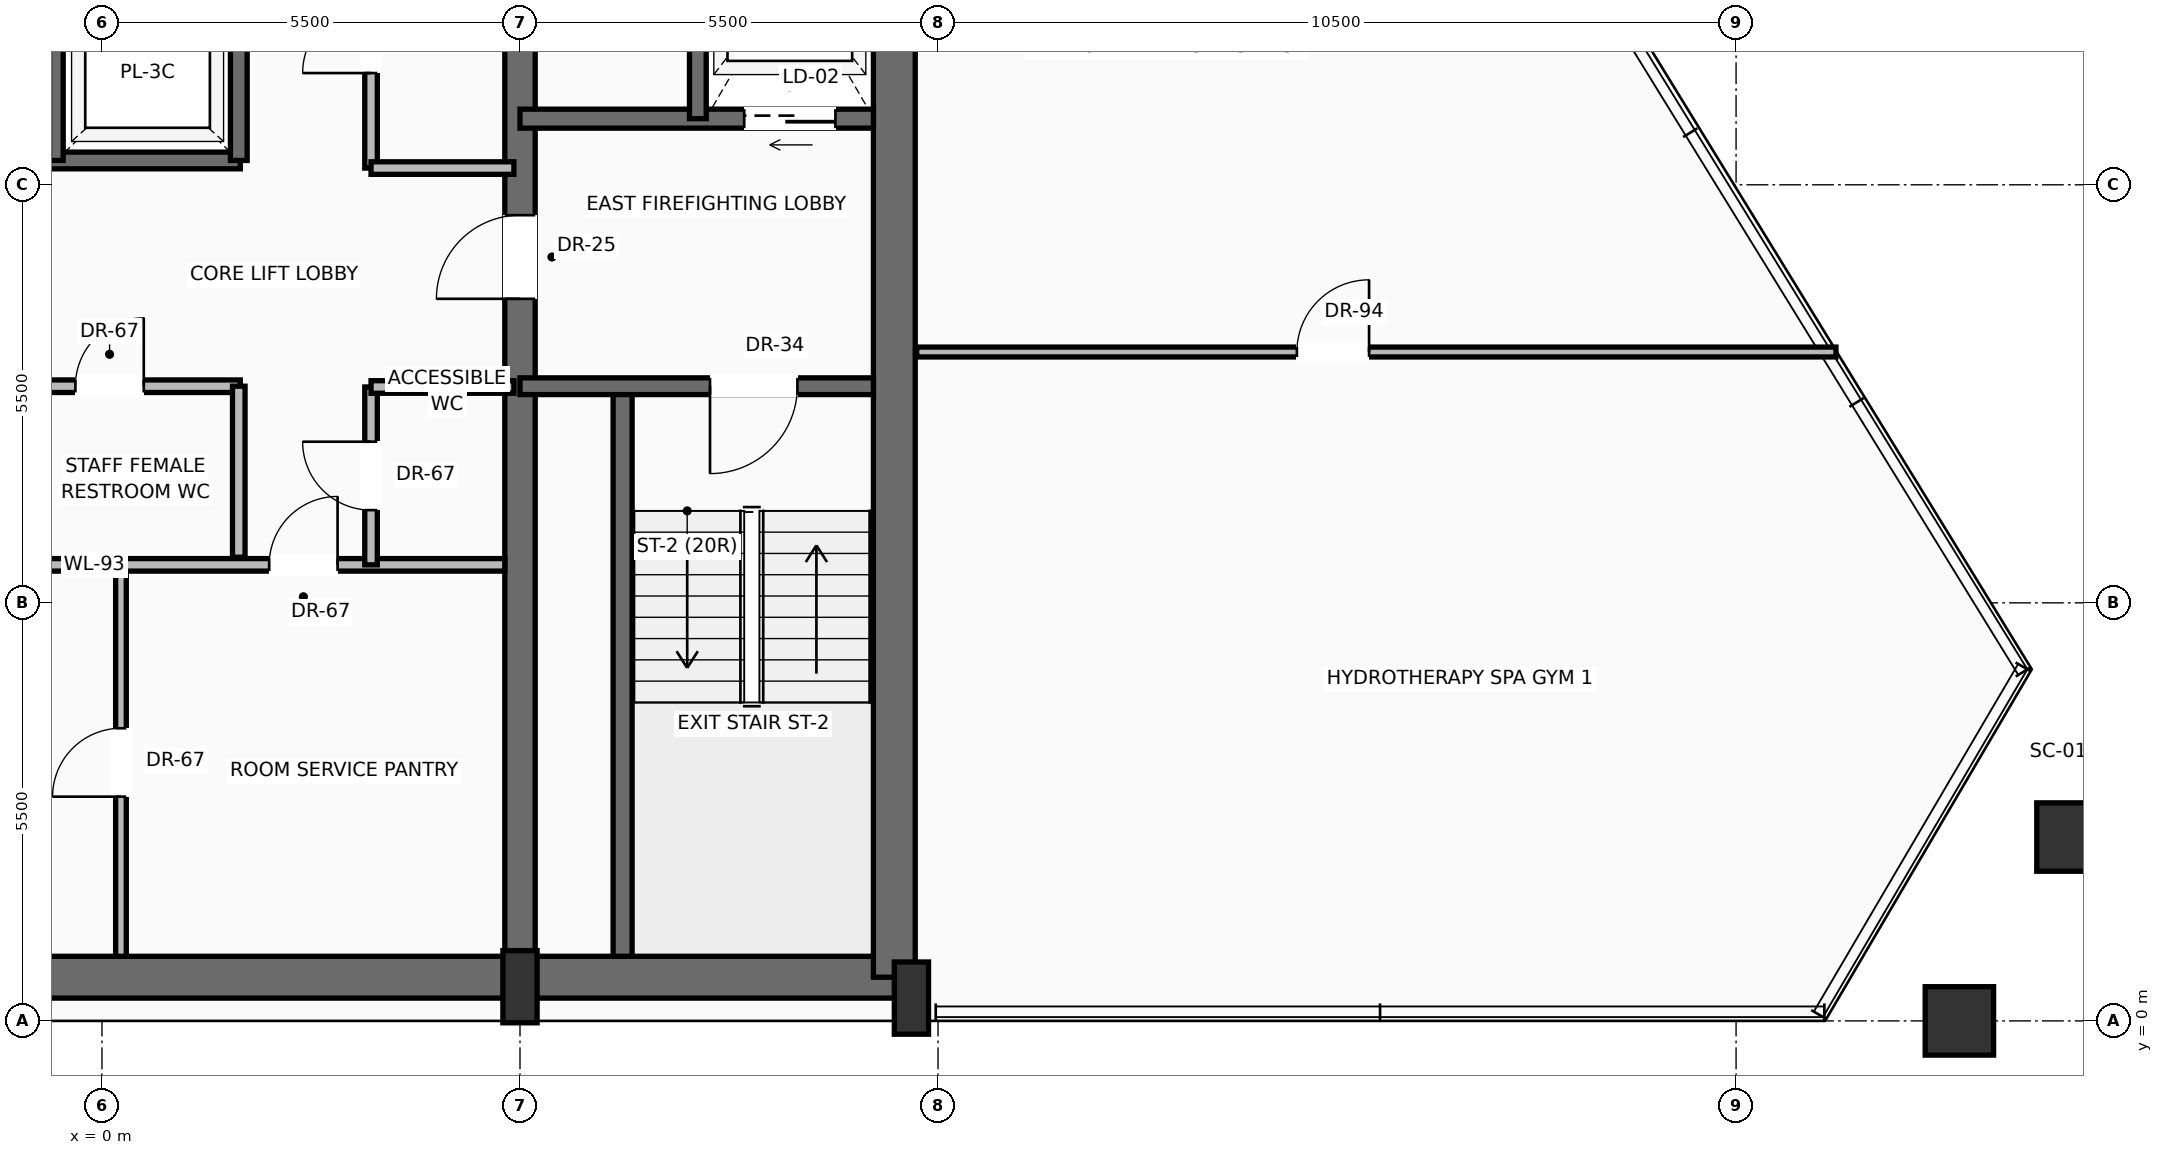
"""IFC4 building model, lengths in metres.
Left out: names, types, materials, properties, quantities, classifications, styles, units other than length and angle.
Written with IfcOpenShell. Run it as: python <this file> out.ifc"""

import sys

from ifc_helpers import new_model, si_unit, direction, frame, frame_2d, origin, origin_2d, place, context, subcontext, project, spatial, rectangle, hollow_rectangle, extrude, source, transform, mapped, element, fill, save


model = new_model("IFC4")
c1 = context("Model", 3, precision=1e-05, world=origin(), true_north=direction((0.0, 1.0)))
c2 = subcontext(c1, "Body", "Model", "MODEL_VIEW")
j1 = project(units=[si_unit("LENGTHUNIT", "METRE"), si_unit("PLANEANGLEUNIT", "RADIAN")], contexts=[c1])
p1 = place(None, origin())
s1 = spatial("IfcSite", under=j1, at=p1, CompositionType="ELEMENT")
p2 = place(p1, origin())
s2 = spatial("IfcBuilding", under=s1, at=p2, CompositionType="ELEMENT")
p3 = place(p2, frame((0.0, 0.0, 244.15)))
s3 = spatial("IfcBuildingStorey", under=s2, at=p3, CompositionType="ELEMENT", Elevation=244.15)
p4 = place(p3, frame((-10.65, 0.575, 0.0), z_axis=(0.0, 0.0, 1.0), x_axis=(1.0, 0.0, 0.0)))
e1 = element("IfcWall", 1, at=p4, inside=s3, PredefinedType="SHEAR", context=c2, shape_type="SweptSolid", body=[
    extrude(rectangle(XDim=21.3, YDim=0.55, at=frame_2d((10.65, 0.0))), origin(), (0.0, 0.0, 1.0), 3.24),
])
p5 = place(p3, frame((10.425, 0.575, 0.0), z_axis=(0.0, 0.0, 1.0), x_axis=(0.0, 1.0, 0.0)))
e2 = element("IfcWall", 2, at=p5, inside=s3, PredefinedType="SHEAR", context=c2, shape_type="SweptSolid", body=[
    extrude(rectangle(XDim=15.45, YDim=0.55, at=frame_2d((7.725, 0.0))), origin(), (0.0, 0.0, 1.0), 3.24),
])
p6 = place(p3, frame((5.5, 0.575, 0.0), z_axis=(0.0, 0.0, 1.0), x_axis=(0.0, 1.0, 0.0)))
e3 = element("IfcWall", 3, at=p6, inside=s3, PredefinedType="SHEAR", context=c2, shape_type="SweptSolid", body=[
    extrude(rectangle(XDim=15.45, YDim=0.4, at=frame_2d((7.725, 0.0))), origin(), (0.0, 0.0, 1.0), 3.24),
])
p7 = place(p6, frame((8.925, 0.0, 0.0)))
e4 = element("IfcOpeningElement", 4, at=p7, cuts=e3, PredefinedType="OPENING", context=c2, shape_type="SweptSolid", body=[
    extrude(rectangle(XDim=1.1, YDim=2.2, at=frame_2d((0.55, 1.1))), frame((0.0, 0.21, 0.0), z_axis=(0.0, -1.0, 0.0), x_axis=(1.0, 0.0, 0.0)), (0.0, 0.0, 1.0), 0.42),
])
m1 = source(origin(), c2, "Body", "SweptSolid", [
    extrude(rectangle(XDim=0.45, YDim=0.95, at=origin_2d()), origin(), (0.0, 0.0, 1.0), 3.45),
])
for number, where, z_axis, x_axis in (
    (5, (5.5, 0.45, 0.0), (0.0, 0.0, 1.0), (1.0, 0.0, 0.0)),
    (6, (10.65, 0.3, 0.0), (0.0, 0.0, 1.0), (1.0, 0.0, 0.0)),
):
    element("IfcColumn", number, at=place(p3, frame(where, z_axis=z_axis, x_axis=x_axis)), inside=s3, PredefinedType="PILASTER", context=c2, shape_type="MappedRepresentation", body=[
        mapped(m1, transform((0.0, 0.0, 0.0), scale=1.0)),
    ])
m2 = source(origin(), c2, "Body", "SweptSolid", [
    extrude(hollow_rectangle(XDim=0.9, YDim=0.9, WallThickness=0.045, at=origin_2d()), origin(), (0.0, 0.0, 1.0), 3.441),
])
p8 = place(p3, frame((24.438, 0.0, 0.004), z_axis=(0.000567536798, 0.0, 0.999999838951), x_axis=(1.0, 0.0, 0.0)))
e7 = element("IfcColumn", 7, at=p8, inside=s3, PredefinedType="COLUMN", context=c2, shape_type="MappedRepresentation", body=[
    mapped(m2, transform((0.0, 0.0, 0.0), scale=1.0)),
])
m3 = source(origin(), c2, "Body", "SweptSolid", [
    extrude(hollow_rectangle(XDim=0.9, YDim=0.9, WallThickness=0.045, at=origin_2d()), origin(), (0.0, 0.0, 1.0), 3.442),
])
p9 = place(p3, frame((25.906, 2.419, 0.004), z_axis=(-0.010213783405, -0.016242752776, 0.999815908861), x_axis=(0.846541360578, -0.53232295163, 0.0)))
e8 = element("IfcColumn", 8, at=p9, inside=s3, PredefinedType="COLUMN", context=c2, shape_type="MappedRepresentation", body=[
    mapped(m3, transform((0.0, 0.0, 0.0), scale=1.0)),
])
p10 = place(p3, frame((6.85, 0.85, 0.0), z_axis=(0.0, 0.0, 1.0), x_axis=(0.0, 1.0, 0.0)))
e9 = element("IfcWall", 9, at=p10, inside=s3, PredefinedType="SOLIDWALL", context=c2, shape_type="SweptSolid", body=[
    extrude(rectangle(XDim=7.5, YDim=0.25, at=frame_2d((3.75, 0.0))), origin(), (0.0, 0.0, 1.0), 3.24),
])
p11 = place(p3, frame((10.15, 8.35, 0.0), z_axis=(0.0, 0.0, 1.0), x_axis=(-1.0, 0.0, 0.0)))
e10 = element("IfcWall", 10, at=p11, inside=s3, PredefinedType="SOLIDWALL", context=c2, shape_type="SweptSolid", body=[
    extrude(rectangle(XDim=4.65, YDim=0.22, at=frame_2d((2.325, 0.0))), origin(), (0.0, 0.0, 1.0), 3.24),
])
p12 = place(p11, frame((1.0, 0.0, 0.0)))
e11 = element("IfcOpeningElement", 11, at=p12, cuts=e10, PredefinedType="OPENING", context=c2, shape_type="SweptSolid", body=[
    extrude(rectangle(XDim=1.15, YDim=2.2, at=frame_2d((0.575, 1.1))), frame((0.0, 0.12, 0.0), z_axis=(0.0, -1.0, 0.0), x_axis=(1.0, 0.0, 0.0)), (0.0, 0.0, 1.0), 0.24),
])
p13 = place(p3, frame((10.15, 11.87, 0.0), z_axis=(0.0, 0.0, 1.0), x_axis=(-1.0, 0.0, 0.0)))
e12 = element("IfcWall", 12, at=p13, inside=s3, PredefinedType="SOLIDWALL", context=c2, shape_type="SweptSolid", body=[
    extrude(rectangle(XDim=4.65, YDim=0.25, at=frame_2d((2.325, 0.0))), origin(), (0.0, 0.0, 1.0), 3.24),
])
p14 = place(p13, frame((0.5, 0.0, 0.0)))
e13 = element("IfcOpeningElement", 13, at=p14, cuts=e12, PredefinedType="OPENING", context=c2, shape_type="SweptSolid", body=[
    extrude(rectangle(XDim=1.2, YDim=2.25, at=frame_2d((0.6, 1.125))), frame((0.0, 0.135, 0.0), z_axis=(0.0, -1.0, 0.0), x_axis=(1.0, 0.0, 0.0)), (0.0, 0.0, 1.0), 0.27),
])
p15 = place(p3, frame((7.84, 11.87, 0.0), z_axis=(0.0, 0.0, 1.0), x_axis=(0.0, 1.0, 0.0)))
e14 = element("IfcWall", 14, at=p15, inside=s3, PredefinedType="SOLIDWALL", context=c2, shape_type="SweptSolid", body=[
    extrude(rectangle(XDim=3.88, YDim=0.22, at=frame_2d((1.94, 0.0))), origin(), (0.0, 0.0, 1.0), 3.24),
])
p16 = place(p3, frame((-5.5, 6.0, 0.0), z_axis=(0.0, 0.0, 1.0), x_axis=(1.0, 0.0, 0.0)))
e15 = element("IfcWall", 15, at=p16, inside=s3, PredefinedType="PARTITIONING", context=c2, shape_type="SweptSolid", body=[
    extrude(rectangle(XDim=10.8, YDim=0.165, at=frame_2d((5.4, 0.0))), origin(), (0.0, 0.0, 1.0), 3.232),
])
p17 = place(p16, frame((7.7, 0.0, 0.0)))
e16 = element("IfcOpeningElement", 16, at=p17, cuts=e15, PredefinedType="OPENING", context=c2, shape_type="SweptSolid", body=[
    extrude(rectangle(XDim=0.9, YDim=2.1, at=frame_2d((0.45, 1.05))), frame((0.0, 0.093, 0.0), z_axis=(0.0, -1.0, 0.0), x_axis=(1.0, 0.0, 0.0)), (0.0, 0.0, 1.0), 0.185),
])
p18 = place(p3, frame((0.25, 0.85, 0.0), z_axis=(0.0, 0.0, 1.0), x_axis=(0.0, 1.0, 0.0)))
e17 = element("IfcWall", 17, at=p18, inside=s3, PredefinedType="PARTITIONING", context=c2, shape_type="SweptSolid", body=[
    extrude(rectangle(XDim=5.03, YDim=0.14, at=frame_2d((2.515, 0.0))), origin(), (0.0, 0.0, 1.0), 3.232),
])
p19 = place(p18, frame((2.1, 0.0, 0.0)))
e18 = element("IfcOpeningElement", 18, at=p19, cuts=e17, PredefinedType="OPENING", context=c2, shape_type="SweptSolid", body=[
    extrude(rectangle(XDim=0.9, YDim=2.1, at=frame_2d((0.45, 1.05))), frame((0.0, 0.08, 0.0), z_axis=(0.0, -1.0, 0.0), x_axis=(1.0, 0.0, 0.0)), (0.0, 0.0, 1.0), 0.16),
])
p20 = place(p3, frame((3.54, 6.0, 0.0), z_axis=(0.0, 0.0, 1.0), x_axis=(0.0, 1.0, 0.0)))
e19 = element("IfcWall", 19, at=p20, inside=s3, PredefinedType="PARTITIONING", context=c2, shape_type="SweptSolid", body=[
    extrude(rectangle(XDim=2.34, YDim=0.165, at=frame_2d((1.17, 0.0))), origin(), (0.0, 0.0, 1.0), 3.232),
])
p21 = place(p20, frame((0.72, 0.0, 0.0)))
e20 = element("IfcOpeningElement", 20, at=p21, cuts=e19, PredefinedType="OPENING", context=c2, shape_type="SweptSolid", body=[
    extrude(rectangle(XDim=0.9, YDim=2.1, at=frame_2d((0.45, 1.05))), frame((0.0, 0.093, 0.0), z_axis=(0.0, -1.0, 0.0), x_axis=(1.0, 0.0, 0.0)), (0.0, 0.0, 1.0), 0.185),
])
p22 = place(p3, frame((3.54, 8.34, 0.0), z_axis=(0.0, 0.0, 1.0), x_axis=(1.0, 0.0, 0.0)))
e21 = element("IfcWall", 21, at=p22, inside=s3, PredefinedType="PARTITIONING", context=c2, shape_type="SweptSolid", body=[
    extrude(rectangle(XDim=1.88, YDim=0.165, at=frame_2d((0.94, 0.0))), origin(), (0.0, 0.0, 1.0), 3.232),
])
p23 = place(p3, frame((-5.3, 8.35, 0.0), z_axis=(0.0, 0.0, 1.0), x_axis=(1.0, 0.0, 0.0)))
e22 = element("IfcWall", 22, at=p23, inside=s3, PredefinedType="PARTITIONING", context=c2, shape_type="SweptSolid", body=[
    extrude(rectangle(XDim=7.12, YDim=0.165, at=frame_2d((3.56, 0.0))), origin(), (0.0, 0.0, 1.0), 3.232),
])
p24 = place(p23, frame((0.85, 0.0, 0.0)))
e23 = element("IfcOpeningElement", 23, at=p24, cuts=e22, PredefinedType="OPENING", context=c2, shape_type="SweptSolid", body=[
    extrude(rectangle(XDim=0.9, YDim=2.1, at=frame_2d((0.45, 1.05))), frame((0.0, 0.093, 0.0), z_axis=(0.0, -1.0, 0.0), x_axis=(1.0, 0.0, 0.0)), (0.0, 0.0, 1.0), 0.185),
])
p25 = place(p23, frame((4.95, 0.0, 0.0)))
e24 = element("IfcOpeningElement", 24, at=p25, cuts=e22, PredefinedType="OPENING", context=c2, shape_type="SweptSolid", body=[
    extrude(rectangle(XDim=0.9, YDim=2.1, at=frame_2d((0.45, 1.05))), frame((0.0, 0.093, 0.0), z_axis=(0.0, -1.0, 0.0), x_axis=(1.0, 0.0, 0.0)), (0.0, 0.0, 1.0), 0.185),
])
p26 = place(p3, frame((1.8, 6.1, 0.0), z_axis=(0.0, 0.0, 1.0), x_axis=(0.0, 1.0, 0.0)))
e25 = element("IfcWall", 25, at=p26, inside=s3, PredefinedType="PARTITIONING", context=c2, shape_type="SweptSolid", body=[
    extrude(rectangle(XDim=2.25, YDim=0.165, at=frame_2d((1.125, 0.0))), origin(), (0.0, 0.0, 1.0), 3.232),
])
p27 = place(p3, frame((-5.5, 11.32, 0.0), z_axis=(0.0, 0.0, 1.0), x_axis=(1.0, 0.0, 0.0)))
e26 = element("IfcWall", 26, at=p27, inside=s3, PredefinedType="SOLIDWALL", context=c2, shape_type="SweptSolid", body=[
    extrude(rectangle(XDim=7.32, YDim=0.22, at=frame_2d((3.66, 0.0))), origin(), (0.0, 0.0, 1.0), 3.24),
])
p28 = place(p3, frame((1.8, 11.32, 0.0), z_axis=(0.0, 0.0, 1.0), x_axis=(0.0, 1.0, 0.0)))
e27 = element("IfcWall", 27, at=p28, inside=s3, PredefinedType="SOLIDWALL", context=c2, shape_type="SweptSolid", body=[
    extrude(rectangle(XDim=2.3, YDim=0.22, at=frame_2d((1.15, 0.0))), origin(), (0.0, 0.0, 1.0), 3.24),
])
p29 = place(p3, frame((-0.6, 11.32, 0.0), z_axis=(0.0, 0.0, 1.0), x_axis=(0.0, 1.0, 0.0)))
e28 = element("IfcWall", 28, at=p29, inside=s3, PredefinedType="SOLIDWALL", context=c2, shape_type="SweptSolid", body=[
    extrude(rectangle(XDim=2.3, YDim=0.18, at=frame_2d((1.15, 0.0))), origin(), (0.0, 0.0, 1.0), 3.24),
])
p30 = place(p3, frame((3.54, 11.22, 0.0), z_axis=(0.0, 0.0, 1.0), x_axis=(0.0, 1.0, 0.0)))
e29 = element("IfcWall", 29, at=p30, inside=s3, PredefinedType="PARTITIONING", context=c2, shape_type="SweptSolid", body=[
    extrude(rectangle(XDim=4.53, YDim=0.165, at=frame_2d((2.265, 0.0))), origin(), (0.0, 0.0, 1.0), 3.232),
])
p31 = place(p30, frame((1.25, 0.0, 0.0)))
e30 = element("IfcOpeningElement", 30, at=p31, cuts=e29, PredefinedType="OPENING", context=c2, shape_type="SweptSolid", body=[
    extrude(rectangle(XDim=0.9, YDim=2.1, at=frame_2d((0.45, 1.05))), frame((0.0, 0.093, 0.0), z_axis=(0.0, -1.0, 0.0), x_axis=(1.0, 0.0, 0.0)), (0.0, 0.0, 1.0), 0.185),
])
p32 = place(p3, frame((3.54, 11.22, 0.0), z_axis=(0.0, 0.0, 1.0), x_axis=(1.0, 0.0, 0.0)))
e31 = element("IfcWall", 31, at=p32, inside=s3, PredefinedType="PARTITIONING", context=c2, shape_type="SweptSolid", body=[
    extrude(rectangle(XDim=1.88, YDim=0.165, at=frame_2d((0.94, 0.0))), origin(), (0.0, 0.0, 1.0), 3.232),
])
p33 = place(p3, frame((10.72, 8.8, 0.0), z_axis=(0.0, 0.0, 1.0), x_axis=(1.0, 0.0, 0.0)))
e32 = element("IfcWall", 32, at=p33, inside=s3, PredefinedType="PARTITIONING", context=c2, shape_type="SweptSolid", body=[
    extrude(rectangle(XDim=12.094, YDim=0.13, at=frame_2d((6.047, 0.0))), origin(), (0.0, 0.0, 1.0), 3.232),
])
p34 = place(p33, frame((5.001, 0.0, 0.0)))
e33 = element("IfcOpeningElement", 33, at=p34, cuts=e32, PredefinedType="OPENING", context=c2, shape_type="SweptSolid", body=[
    extrude(rectangle(XDim=0.95, YDim=2.2, at=frame_2d((0.475, 1.1))), frame((0.0, 0.075, 0.0), z_axis=(0.0, -1.0, 0.0), x_axis=(1.0, 0.0, 0.0)), (0.0, 0.0, 1.0), 0.15),
])
m4 = source(origin(), c2, "Body", "SweptSolid", [
    extrude(rectangle(XDim=1.15, YDim=2.2, at=frame_2d((0.575, 1.1))), frame((0.0, 0.025, 0.0), z_axis=(0.0, -1.0, 0.0), x_axis=(1.0, 0.0, 0.0)), (0.0, 0.0, 1.0), 0.05),
])
p35 = place(p12, origin())
e34 = element("IfcDoor", 34, at=p35, inside=s3, OperationType="SINGLE_SWING_RIGHT", PredefinedType="DOOR", context=c2, shape_type="MappedRepresentation", body=[
    mapped(m4, transform((0.0, 0.0, 0.0), scale=1.0)),
])
fill(e11, e34)
m5 = source(origin(), c2, "Body", "SweptSolid", [
    extrude(rectangle(XDim=1.1, YDim=2.2, at=frame_2d((0.55, 1.1))), frame((0.0, 0.025, 0.0), z_axis=(0.0, -1.0, 0.0), x_axis=(1.0, 0.0, 0.0)), (0.0, 0.0, 1.0), 0.05),
])
p36 = place(p7, origin())
e35 = element("IfcDoor", 35, at=p36, inside=s3, OperationType="SINGLE_SWING_LEFT", PredefinedType="DOOR", context=c2, shape_type="MappedRepresentation", body=[
    mapped(m5, transform((0.0, 0.0, 0.0), scale=1.0)),
])
fill(e4, e35)
m6 = source(origin(), c2, "Body", "SweptSolid", [
    extrude(rectangle(XDim=1.2, YDim=2.25, at=frame_2d((0.6, 1.125))), frame((0.0, 0.025, 0.0), z_axis=(0.0, -1.0, 0.0), x_axis=(1.0, 0.0, 0.0)), (0.0, 0.0, 1.0), 0.05),
])
p37 = place(p14, origin())
e36 = element("IfcDoor", 36, at=p37, inside=s3, OperationType="SLIDING_TO_RIGHT", PredefinedType="DOOR", context=c2, shape_type="MappedRepresentation", body=[
    mapped(m6, transform((0.0, 0.0, 0.0), scale=1.0)),
])
fill(e13, e36)
m7 = source(origin(), c2, "Body", "SweptSolid", [
    extrude(rectangle(XDim=0.9, YDim=2.1, at=frame_2d((0.45, 1.05))), frame((0.0, 0.025, 0.0), z_axis=(0.0, -1.0, 0.0), x_axis=(1.0, 0.0, 0.0)), (0.0, 0.0, 1.0), 0.05),
])
p38 = place(p17, origin())
e37 = element("IfcDoor", 37, at=p38, inside=s3, OperationType="SINGLE_SWING_RIGHT", PredefinedType="DOOR", context=c2, shape_type="MappedRepresentation", body=[
    mapped(m7, transform((0.0, 0.0, 0.0), scale=1.0)),
])
fill(e16, e37)
p39 = place(p19, origin())
e38 = element("IfcDoor", 38, at=p39, inside=s3, OperationType="SINGLE_SWING_LEFT", PredefinedType="DOOR", context=c2, shape_type="MappedRepresentation", body=[
    mapped(m7, transform((0.0, 0.0, 0.0), scale=1.0)),
])
fill(e18, e38)
p40 = place(p21, origin())
e39 = element("IfcDoor", 39, at=p40, inside=s3, OperationType="SINGLE_SWING_RIGHT", PredefinedType="DOOR", context=c2, shape_type="MappedRepresentation", body=[
    mapped(m7, transform((0.0, 0.0, 0.0), scale=1.0)),
])
fill(e20, e39)
p41 = place(p25, origin())
e40 = element("IfcDoor", 40, at=p41, inside=s3, OperationType="SINGLE_SWING_RIGHT", PredefinedType="DOOR", context=c2, shape_type="MappedRepresentation", body=[
    mapped(m7, transform((0.0, 0.0, 0.0), scale=1.0)),
])
fill(e24, e40)
p42 = place(p31, origin())
e41 = element("IfcDoor", 41, at=p42, inside=s3, OperationType="SINGLE_SWING_LEFT", PredefinedType="DOOR", context=c2, shape_type="MappedRepresentation", body=[
    mapped(m7, transform((0.0, 0.0, 0.0), scale=1.0)),
])
fill(e30, e41)
m8 = source(origin(), c2, "Body", "SweptSolid", [
    extrude(rectangle(XDim=0.95, YDim=2.2, at=frame_2d((0.475, 1.1))), frame((0.0, 0.025, 0.0), z_axis=(0.0, -1.0, 0.0), x_axis=(1.0, 0.0, 0.0)), (0.0, 0.0, 1.0), 0.05),
])
p43 = place(p34, origin())
e42 = element("IfcDoor", 42, at=p43, inside=s3, OperationType="SINGLE_SWING_RIGHT", PredefinedType="DOOR", context=c2, shape_type="MappedRepresentation", body=[
    mapped(m8, transform((0.0, 0.0, 0.0), scale=1.0)),
])
fill(e33, e42)
save(model, sys.argv[1])
